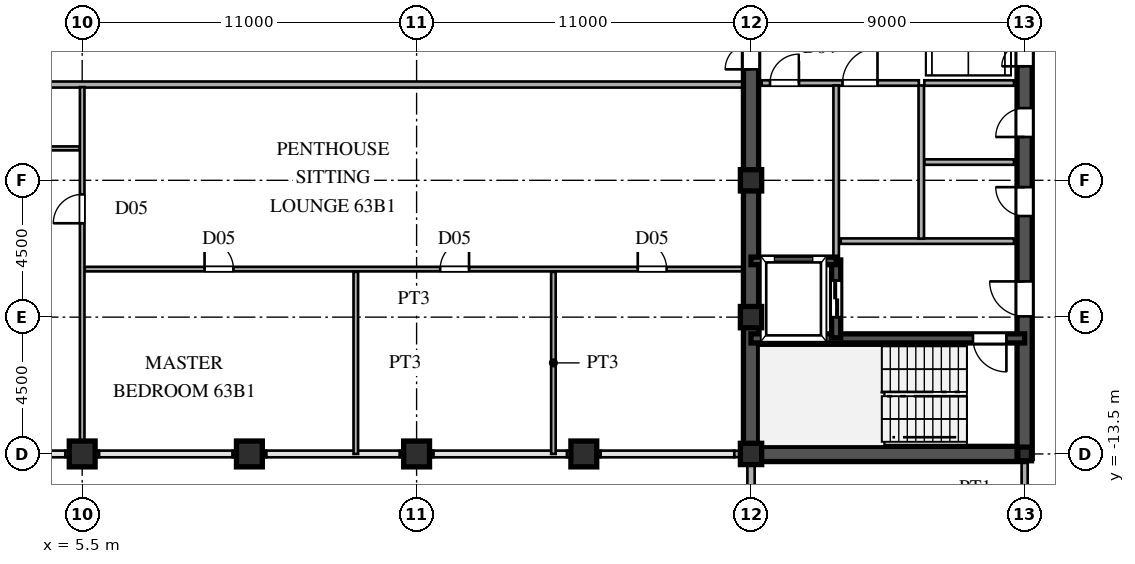
"""IFC4 building model, lengths in metres.
Left out: names, types, materials, properties, quantities, classifications, styles, units other than length and angle.
Written with IfcOpenShell. Run it as: python <this file> out.ifc"""

import sys

from ifc_helpers import new_model, si_unit, direction, frame, frame_2d, origin, origin_2d, place, context, subcontext, project, spatial, rectangle, hollow_rectangle, i_section, extrude, source, transform, mapped, element, fill, save


model = new_model("IFC4")
c1 = context("Model", 3, precision=1e-05, world=origin(), true_north=direction((0.0, 1.0)))
c2 = subcontext(c1, "Body", "Model", "MODEL_VIEW")
j1 = project(units=[si_unit("LENGTHUNIT", "METRE"), si_unit("PLANEANGLEUNIT", "RADIAN")], contexts=[c1])
p1 = place(None, origin())
s1 = spatial("IfcSite", under=j1, at=p1, CompositionType="ELEMENT")
p2 = place(p1, origin())
s2 = spatial("IfcBuilding", under=s1, at=p2, CompositionType="ELEMENT")
p3 = place(p2, frame((0.0, 0.0, 239.4)))
s3 = spatial("IfcBuildingStorey", under=s2, at=p3, CompositionType="ELEMENT", Elevation=239.4)
m1 = source(origin(), c2, "Body", "SweptSolid", [
    extrude(hollow_rectangle(XDim=0.7, YDim=0.7, WallThickness=0.03, at=origin_2d()), origin(), (0.0, 0.0, 1.0), 3.75),
])
for number, where, z_axis, x_axis in (
    (1, (27.5, -13.5, 0.0), (0.0, 0.0, 1.0), (1.0, 0.0, 0.0)),
    (2, (27.5, -9.0, 0.0), (0.0, 0.0, 1.0), (1.0, 0.0, 0.0)),
    (3, (27.5, -4.5, 0.0), (0.0, 0.0, 1.0), (1.0, 0.0, 0.0)),
):
    element("IfcColumn", number, at=place(p3, frame(where, z_axis=z_axis, x_axis=x_axis)), inside=s3, PredefinedType="COLUMN", context=c2, shape_type="MappedRepresentation", body=[
        mapped(m1, transform((0.0, 0.0, 0.0), scale=1.0)),
    ])
m2 = source(origin(), c2, "Body", "SweptSolid", [
    extrude(i_section(OverallWidth=0.45, OverallDepth=0.45, WebThickness=0.016, FlangeThickness=0.025, at=origin_2d()), origin(), (0.0, 0.0, 1.0), 3.75),
])
p4 = place(p3, frame((36.5, -13.5, 0.0), z_axis=(0.0, 0.0, 1.0), x_axis=(1.0, 0.0, 0.0)))
e4 = element("IfcColumn", 4, at=p4, inside=s3, PredefinedType="COLUMN", context=c2, shape_type="MappedRepresentation", body=[
    mapped(m2, transform((0.0, 0.0, 0.0), scale=1.0)),
])
m3 = source(origin(), c2, "Body", "SweptSolid", [
    extrude(hollow_rectangle(XDim=0.85, YDim=0.85, WallThickness=0.036, at=origin_2d()), origin(), (0.0, 0.0, 1.0), 3.75),
])
for number, where, z_axis, x_axis in (
    (5, (5.5, -13.5, 0.0), (0.0, 0.0, 1.0), (1.0, 0.0, 0.0)),
    (6, (11.0, -13.5, 0.0), (0.0, 0.0, 1.0), (1.0, 0.0, 0.0)),
    (7, (16.5, -13.5, 0.0), (0.0, 0.0, 1.0), (1.0, 0.0, 0.0)),
    (8, (22.0, -13.5, 0.0), (0.0, 0.0, 1.0), (1.0, 0.0, 0.0)),
):
    element("IfcColumn", number, at=place(p3, frame(where, z_axis=z_axis, x_axis=x_axis)), inside=s3, PredefinedType="COLUMN", context=c2, shape_type="MappedRepresentation", body=[
        mapped(m3, transform((0.0, 0.0, 0.0), scale=1.0)),
    ])
p5 = place(p3, frame((27.5, -15.98, 0.0), z_axis=(0.0, 0.0, 1.0), x_axis=(0.0, 1.0, 0.0)))
e9 = element("IfcWall", 9, at=p5, inside=s3, PredefinedType="SOLIDWALL", context=c2, shape_type="SweptSolid", body=[
    extrude(rectangle(XDim=1.605, YDim=0.24, at=frame_2d((0.803, 0.0))), origin(), (0.0, 0.0, 1.0), 3.53),
])
p6 = place(p3, frame((27.5, -14.375, 0.0), z_axis=(0.0, 0.0, 1.0), x_axis=(0.0, 1.0, 0.0)))
e10 = element("IfcWall", 10, at=p6, inside=s3, PredefinedType="SOLIDWALL", context=c2, shape_type="SweptSolid", body=[
    extrude(rectangle(XDim=0.62, YDim=0.24, at=frame_2d((0.31, 0.0))), origin(), (0.0, 0.0, 1.0), 3.03),
])
for number, where, z_axis, x_axis in (
    (11, (4.95, -13.5, 0.0), (0.0, 0.0, 1.0), (1.0, 0.0, 0.0)),
    (12, (10.45, -13.5, 0.0), (0.0, 0.0, 1.0), (1.0, 0.0, 0.0)),
    (13, (15.95, -13.5, 0.0), (0.0, 0.0, 1.0), (1.0, 0.0, 0.0)),
    (14, (21.45, -13.5, 0.0), (0.0, 0.0, 1.0), (1.0, 0.0, 0.0)),
):
    element("IfcWall", number, at=place(p3, frame(where, z_axis=z_axis, x_axis=x_axis)), inside=s3, PredefinedType="SOLIDWALL", context=c2, shape_type="SweptSolid", body=[
        extrude(rectangle(XDim=1.1, YDim=0.21, at=frame_2d((0.55, 0.0))), origin(), (0.0, 0.0, 1.0), 3.03),
    ])
p7 = place(p3, frame((26.95, -13.5, 0.0), z_axis=(0.0, 0.0, 1.0), x_axis=(1.0, 0.0, 0.0)))
e15 = element("IfcWall", 15, at=p7, inside=s3, PredefinedType="SOLIDWALL", context=c2, shape_type="SweptSolid", body=[
    extrude(rectangle(XDim=0.54, YDim=0.21, at=frame_2d((0.27, 0.0))), origin(), (0.0, 0.0, 1.0), 3.03),
])
p8 = place(p3, frame((27.5, -13.5, 0.0), z_axis=(0.0, 0.0, 1.0), x_axis=(0.0, 1.0, 0.0)))
e16 = element("IfcWall", 16, at=p8, inside=s3, PredefinedType="SHEAR", context=c2, shape_type="SweptSolid", body=[
    extrude(rectangle(XDim=12.2, YDim=0.5, at=frame_2d((6.1, 0.0))), origin(), (0.0, 0.0, 1.0), 3.53),
])
p9 = place(p3, frame((27.5, -1.3, 0.0), z_axis=(0.0, 0.0, 1.0), x_axis=(0.0, 1.0, 0.0)))
e17 = element("IfcWall", 17, at=p9, inside=s3, PredefinedType="SHEAR", context=c2, shape_type="SweptSolid", body=[
    extrude(rectangle(XDim=2.6, YDim=0.5, at=frame_2d((1.3, 0.0))), origin(), (0.0, 0.0, 1.0), 3.53),
])
p10 = place(p9, frame((0.45, 0.0, 0.0)))
e18 = element("IfcOpeningElement", 18, at=p10, cuts=e17, PredefinedType="OPENING", context=c2, shape_type="SweptSolid", body=[
    extrude(rectangle(XDim=1.7, YDim=2.35, at=frame_2d((0.85, 1.175))), frame((0.0, 0.26, 0.0), z_axis=(0.0, -1.0, 0.0), x_axis=(1.0, 0.0, 0.0)), (0.0, 0.0, 1.0), 0.52),
])
p11 = place(p3, frame((27.5, -13.5, 0.0), z_axis=(0.0, 0.0, 1.0), x_axis=(1.0, 0.0, 0.0)))
e19 = element("IfcWall", 19, at=p11, inside=s3, PredefinedType="SHEAR", context=c2, shape_type="SweptSolid", body=[
    extrude(rectangle(XDim=9.0, YDim=0.5, at=frame_2d((4.5, 0.0))), origin(), (0.0, 0.0, 1.0), 3.53),
])
p12 = place(p3, frame((36.5, -13.65, 0.0), z_axis=(0.0, 0.0, 1.0), x_axis=(0.0, 1.0, 0.0)))
e20 = element("IfcWall", 20, at=p12, inside=s3, PredefinedType="SHEAR", context=c2, shape_type="SweptSolid", body=[
    extrude(rectangle(XDim=7.15, YDim=0.5, at=frame_2d((3.575, 0.0))), origin(), (0.0, 0.0, 1.0), 3.53),
])
p13 = place(p12, frame((4.675, 0.0, 0.0)))
e21 = element("IfcOpeningElement", 21, at=p13, cuts=e20, PredefinedType="OPENING", context=c2, shape_type="SweptSolid", body=[
    extrude(rectangle(XDim=1.15, YDim=2.2, at=frame_2d((0.575, 1.1))), frame((0.0, 0.26, 0.0), z_axis=(0.0, -1.0, 0.0), x_axis=(1.0, 0.0, 0.0)), (0.0, 0.0, 1.0), 0.52),
])
p14 = place(p3, frame((36.5, -1.3, 0.0), z_axis=(0.0, 0.0, 1.0), x_axis=(0.0, 1.0, 0.0)))
e22 = element("IfcWall", 22, at=p14, inside=s3, PredefinedType="SHEAR", context=c2, shape_type="SweptSolid", body=[
    extrude(rectangle(XDim=2.6, YDim=0.5, at=frame_2d((1.3, 0.0))), origin(), (0.0, 0.0, 1.0), 3.53),
])
p15 = place(p14, frame((0.55, 0.0, 0.0)))
e23 = element("IfcOpeningElement", 23, at=p15, cuts=e22, PredefinedType="OPENING", context=c2, shape_type="SweptSolid", body=[
    extrude(rectangle(XDim=1.5, YDim=2.3, at=frame_2d((0.75, 1.15))), frame((0.0, 0.26, 0.0), z_axis=(0.0, -1.0, 0.0), x_axis=(1.0, 0.0, 0.0)), (0.0, 0.0, 1.0), 0.52),
])
p16 = place(p3, frame((36.5, -6.5, 0.0), z_axis=(0.0, 0.0, 1.0), x_axis=(0.0, 1.0, 0.0)))
e24 = element("IfcWall", 24, at=p16, inside=s3, PredefinedType="SHEAR", context=c2, shape_type="SweptSolid", body=[
    extrude(rectangle(XDim=2.6, YDim=0.5, at=frame_2d((1.3, 0.0))), origin(), (0.0, 0.0, 1.0), 3.53),
])
p17 = place(p16, frame((0.825, 0.0, 0.0)))
e25 = element("IfcOpeningElement", 25, at=p17, cuts=e24, PredefinedType="OPENING", context=c2, shape_type="SweptSolid", body=[
    extrude(rectangle(XDim=0.95, YDim=2.15, at=frame_2d((0.475, 1.075))), frame((0.0, 0.26, 0.0), z_axis=(0.0, -1.0, 0.0), x_axis=(1.0, 0.0, 0.0)), (0.0, 0.0, 1.0), 0.52),
])
p18 = place(p3, frame((36.5, -3.9, 0.0), z_axis=(0.0, 0.0, 1.0), x_axis=(0.0, 1.0, 0.0)))
e26 = element("IfcWall", 26, at=p18, inside=s3, PredefinedType="SHEAR", context=c2, shape_type="SweptSolid", body=[
    extrude(rectangle(XDim=2.6, YDim=0.5, at=frame_2d((1.3, 0.0))), origin(), (0.0, 0.0, 1.0), 3.53),
])
p19 = place(p18, frame((0.825, 0.0, 0.0)))
e27 = element("IfcOpeningElement", 27, at=p19, cuts=e26, PredefinedType="OPENING", context=c2, shape_type="SweptSolid", body=[
    extrude(rectangle(XDim=0.95, YDim=2.15, at=frame_2d((0.475, 1.075))), frame((0.0, 0.26, 0.0), z_axis=(0.0, -1.0, 0.0), x_axis=(1.0, 0.0, 0.0)), (0.0, 0.0, 1.0), 0.52),
])
p20 = place(p3, frame((27.5, -9.7, 0.0), z_axis=(0.0, 0.0, 1.0), x_axis=(1.0, 0.0, 0.0)))
e28 = element("IfcWall", 28, at=p20, inside=s3, PredefinedType="SHEAR", context=c2, shape_type="SweptSolid", body=[
    extrude(rectangle(XDim=9.0, YDim=0.3, at=frame_2d((4.5, 0.0))), origin(), (0.0, 0.0, 1.0), 3.53),
])
p21 = place(p20, frame((7.3, 0.0, 0.0)))
e29 = element("IfcOpeningElement", 29, at=p21, cuts=e28, PredefinedType="OPENING", context=c2, shape_type="SweptSolid", body=[
    extrude(rectangle(XDim=1.1, YDim=2.2, at=frame_2d((0.55, 1.1))), frame((0.0, 0.16, 0.0), z_axis=(0.0, -1.0, 0.0), x_axis=(1.0, 0.0, 0.0)), (0.0, 0.0, 1.0), 0.32),
])
p22 = place(p3, frame((27.5, -7.15, 0.0), z_axis=(0.0, 0.0, 1.0), x_axis=(1.0, 0.0, 0.0)))
e30 = element("IfcWall", 30, at=p22, inside=s3, PredefinedType="SHEAR", context=c2, shape_type="SweptSolid", body=[
    extrude(rectangle(XDim=2.8, YDim=0.25, at=frame_2d((1.4, 0.0))), origin(), (0.0, 0.0, 1.0), 3.53),
])
p23 = place(p3, frame((30.3, -9.68, 0.0), z_axis=(0.0, 0.0, 1.0), x_axis=(0.0, 1.0, 0.0)))
e31 = element("IfcWall", 31, at=p23, inside=s3, PredefinedType="SHEAR", context=c2, shape_type="SweptSolid", body=[
    extrude(rectangle(XDim=2.56, YDim=0.3, at=frame_2d((1.28, 0.0))), origin(), (0.0, 0.0, 1.0), 3.53),
])
p24 = place(p23, frame((0.68, 0.0, 0.0)))
e32 = element("IfcOpeningElement", 32, at=p24, cuts=e31, PredefinedType="OPENING", context=c2, shape_type="SweptSolid", body=[
    extrude(rectangle(XDim=1.2, YDim=2.25, at=frame_2d((0.6, 1.125))), frame((0.0, 0.16, 0.0), z_axis=(0.0, -1.0, 0.0), x_axis=(1.0, 0.0, 0.0)), (0.0, 0.0, 1.0), 0.32),
])
p25 = place(p3, frame((30.45, -6.5, 0.0), z_axis=(0.0, 0.0, 1.0), x_axis=(1.0, 0.0, 0.0)))
e33 = element("IfcWall", 33, at=p25, inside=s3, PredefinedType="PARTITIONING", context=c2, shape_type="SweptSolid", body=[
    extrude(rectangle(XDim=5.7, YDim=0.18, at=frame_2d((2.85, 0.0))), origin(), (0.0, 0.0, 1.0), 3.53),
])
p26 = place(p3, frame((33.1, -6.42, 0.0), z_axis=(0.0, 0.0, 1.0), x_axis=(0.0, 1.0, 0.0)))
e34 = element("IfcWall", 34, at=p26, inside=s3, PredefinedType="PARTITIONING", context=c2, shape_type="SweptSolid", body=[
    extrude(rectangle(XDim=5.04, YDim=0.18, at=frame_2d((2.52, 0.0))), origin(), (0.0, 0.0, 1.0), 3.53),
])
p27 = place(p3, frame((27.85, -1.3, 0.0), z_axis=(0.0, 0.0, 1.0), x_axis=(1.0, 0.0, 0.0)))
e35 = element("IfcWall", 35, at=p27, inside=s3, PredefinedType="PARTITIONING", context=c2, shape_type="SweptSolid", body=[
    extrude(rectangle(XDim=2.45, YDim=0.18, at=frame_2d((1.225, 0.0))), origin(), (0.0, 0.0, 1.0), 3.53),
])
p28 = place(p27, frame((0.275, 0.0, 0.0)))
e36 = element("IfcOpeningElement", 36, at=p28, cuts=e35, PredefinedType="OPENING", context=c2, shape_type="SweptSolid", body=[
    extrude(rectangle(XDim=0.95, YDim=2.15, at=frame_2d((0.475, 1.075))), frame((0.0, 0.1, 0.0), z_axis=(0.0, -1.0, 0.0), x_axis=(1.0, 0.0, 0.0)), (0.0, 0.0, 1.0), 0.2),
])
p29 = place(p3, frame((30.3, -1.3, 0.0), z_axis=(0.0, 0.0, 1.0), x_axis=(1.0, 0.0, 0.0)))
e37 = element("IfcWall", 37, at=p29, inside=s3, PredefinedType="PARTITIONING", context=c2, shape_type="SweptSolid", body=[
    extrude(rectangle(XDim=2.72, YDim=0.18, at=frame_2d((1.36, 0.0))), origin(), (0.0, 0.0, 1.0), 3.53),
])
p30 = place(p29, frame((0.21, 0.0, 0.0)))
e38 = element("IfcOpeningElement", 38, at=p30, cuts=e37, PredefinedType="OPENING", context=c2, shape_type="SweptSolid", body=[
    extrude(rectangle(XDim=1.15, YDim=2.2, at=frame_2d((0.575, 1.1))), frame((0.0, 0.1, 0.0), z_axis=(0.0, -1.0, 0.0), x_axis=(1.0, 0.0, 0.0)), (0.0, 0.0, 1.0), 0.2),
])
p31 = place(p3, frame((30.3, -7.12, 0.0), z_axis=(0.0, 0.0, 1.0), x_axis=(0.0, 1.0, 0.0)))
e39 = element("IfcWall", 39, at=p31, inside=s3, PredefinedType="PARTITIONING", context=c2, shape_type="SweptSolid", body=[
    extrude(rectangle(XDim=5.74, YDim=0.18, at=frame_2d((2.87, 0.0))), origin(), (0.0, 0.0, 1.0), 3.53),
])
for number, where, z_axis, x_axis in (
    (40, (33.2, -1.3, 0.0), (0.0, 0.0, 1.0), (1.0, 0.0, 0.0)),
    (41, (33.2, -3.9, 0.0), (0.0, 0.0, 1.0), (1.0, 0.0, 0.0)),
):
    element("IfcWall", number, at=place(p3, frame(where, z_axis=z_axis, x_axis=x_axis)), inside=s3, PredefinedType="PARTITIONING", context=c2, shape_type="SweptSolid", body=[
        extrude(rectangle(XDim=2.95, YDim=0.18, at=frame_2d((1.475, 0.0))), origin(), (0.0, 0.0, 1.0), 3.53),
    ])
p32 = place(p3, frame((5.585, -7.42, 0.0), z_axis=(0.0, 0.0, 1.0), x_axis=(1.0, 0.0, 0.0)))
e42 = element("IfcWall", 42, at=p32, inside=s3, PredefinedType="PARTITIONING", context=c2, shape_type="SweptSolid", body=[
    extrude(rectangle(XDim=21.66, YDim=0.15, at=frame_2d((10.83, 0.0))), origin(), (0.0, 0.0, 1.0), 3.53),
])
p33 = place(p32, frame((3.94, 0.0, 0.0)))
e43 = element("IfcOpeningElement", 43, at=p33, cuts=e42, PredefinedType="OPENING", context=c2, shape_type="SweptSolid", body=[
    extrude(rectangle(XDim=0.95, YDim=2.15, at=frame_2d((0.475, 1.075))), frame((0.0, 0.085, 0.0), z_axis=(0.0, -1.0, 0.0), x_axis=(1.0, 0.0, 0.0)), (0.0, 0.0, 1.0), 0.17),
])
p34 = place(p32, frame((11.69, 0.0, 0.0)))
e44 = element("IfcOpeningElement", 44, at=p34, cuts=e42, PredefinedType="OPENING", context=c2, shape_type="SweptSolid", body=[
    extrude(rectangle(XDim=0.95, YDim=2.15, at=frame_2d((0.475, 1.075))), frame((0.0, 0.085, 0.0), z_axis=(0.0, -1.0, 0.0), x_axis=(1.0, 0.0, 0.0)), (0.0, 0.0, 1.0), 0.17),
])
p35 = place(p32, frame((18.19, 0.0, 0.0)))
e45 = element("IfcOpeningElement", 45, at=p35, cuts=e42, PredefinedType="OPENING", context=c2, shape_type="SweptSolid", body=[
    extrude(rectangle(XDim=0.95, YDim=2.15, at=frame_2d((0.475, 1.075))), frame((0.0, 0.085, 0.0), z_axis=(0.0, -1.0, 0.0), x_axis=(1.0, 0.0, 0.0)), (0.0, 0.0, 1.0), 0.17),
])
p36 = place(p3, frame((0.085, -3.45, 0.0), z_axis=(0.0, 0.0, 1.0), x_axis=(1.0, 0.0, 0.0)))
e46 = element("IfcWall", 46, at=p36, inside=s3, PredefinedType="PARTITIONING", context=c2, shape_type="SweptSolid", body=[
    extrude(rectangle(XDim=5.33, YDim=0.13, at=frame_2d((2.665, 0.0))), origin(), (0.0, 0.0, 1.0), 3.53),
])
p37 = place(p3, frame((-27.245, -1.35, 0.0), z_axis=(0.0, 0.0, 1.0), x_axis=(1.0, 0.0, 0.0)))
e47 = element("IfcWall", 47, at=p37, inside=s3, PredefinedType="PARTITIONING", context=c2, shape_type="SweptSolid", body=[
    extrude(rectangle(XDim=54.49, YDim=0.2, at=frame_2d((27.245, 0.0))), origin(), (0.0, 0.0, 1.0), 3.53),
])
p38 = place(p37, frame((23.47, 0.0, 0.0)))
e48 = element("IfcOpeningElement", 48, at=p38, cuts=e47, PredefinedType="OPENING", context=c2, shape_type="SweptSolid", body=[
    extrude(rectangle(XDim=1.05, YDim=2.25, at=frame_2d((0.525, 1.125))), frame((0.0, 0.11, 0.0), z_axis=(0.0, -1.0, 0.0), x_axis=(1.0, 0.0, 0.0)), (0.0, 0.0, 1.0), 0.22),
])
p39 = place(p3, frame((5.5, -13.39, 0.0), z_axis=(0.0, 0.0, 1.0), x_axis=(0.0, 1.0, 0.0)))
e49 = element("IfcWall", 49, at=p39, inside=s3, PredefinedType="PARTITIONING", context=c2, shape_type="SweptSolid", body=[
    extrude(rectangle(XDim=11.955, YDim=0.15, at=frame_2d((5.978, 0.0))), origin(), (0.0, 0.0, 1.0), 2.43),
])
p40 = place(p39, frame((7.478, 0.0, 0.0)))
e50 = element("IfcOpeningElement", 50, at=p40, cuts=e49, PredefinedType="OPENING", context=c2, shape_type="SweptSolid", body=[
    extrude(rectangle(XDim=0.95, YDim=2.15, at=frame_2d((0.475, 1.075))), frame((0.0, 0.085, 0.0), z_axis=(0.0, -1.0, 0.0), x_axis=(1.0, 0.0, 0.0)), (0.0, 0.0, 1.0), 0.17),
])
for number, where, z_axis, x_axis in (
    (51, (14.5, -13.5, 0.0), (0.0, 0.0, 1.0), (0.0, 1.0, 0.0)),
    (52, (21.0, -13.5, 0.0), (0.0, 0.0, 1.0), (0.0, 1.0, 0.0)),
):
    element("IfcWall", number, at=place(p3, frame(where, z_axis=z_axis, x_axis=x_axis)), inside=s3, PredefinedType="PARTITIONING", context=c2, shape_type="SweptSolid", body=[
        extrude(rectangle(XDim=5.99, YDim=0.15, at=frame_2d((2.995, 0.0))), origin(), (0.0, 0.0, 1.0), 3.53),
    ])
p41 = place(p3, frame((36.5, -15.515, 0.0), z_axis=(0.0, 0.0, 1.0), x_axis=(0.0, 1.0, 0.0)))
e53 = element("IfcWall", 53, at=p41, inside=s3, PredefinedType="PARTITIONING", context=c2, shape_type="SweptSolid", body=[
    extrude(rectangle(XDim=1.76, YDim=0.2, at=frame_2d((0.88, 0.0))), origin(), (0.0, 0.0, 1.0), 2.93),
])
m4 = source(origin(), c2, "Body", "SweptSolid", [
    extrude(rectangle(XDim=1.7, YDim=2.35, at=frame_2d((0.85, 1.175))), frame((0.0, 0.025, 0.0), z_axis=(0.0, -1.0, 0.0), x_axis=(1.0, 0.0, 0.0)), (0.0, 0.0, 1.0), 0.05),
])
p42 = place(p10, origin())
e54 = element("IfcDoor", 54, at=p42, inside=s3, OperationType="DOUBLE_SWING_LEFT", PredefinedType="DOOR", context=c2, shape_type="MappedRepresentation", body=[
    mapped(m4, transform((0.0, 0.0, 0.0), scale=1.0)),
])
fill(e18, e54)
m5 = source(origin(), c2, "Body", "SweptSolid", [
    extrude(rectangle(XDim=1.15, YDim=2.2, at=frame_2d((0.575, 1.1))), frame((0.0, 0.025, 0.0), z_axis=(0.0, -1.0, 0.0), x_axis=(1.0, 0.0, 0.0)), (0.0, 0.0, 1.0), 0.05),
])
p43 = place(p13, origin())
e55 = element("IfcDoor", 55, at=p43, inside=s3, OperationType="SINGLE_SWING_RIGHT", PredefinedType="DOOR", context=c2, shape_type="MappedRepresentation", body=[
    mapped(m5, transform((0.0, 0.0, 0.0), scale=1.0)),
])
fill(e21, e55)
m6 = source(origin(), c2, "Body", "SweptSolid", [
    extrude(rectangle(XDim=1.5, YDim=2.3, at=frame_2d((0.75, 1.15))), frame((0.0, 0.025, 0.0), z_axis=(0.0, -1.0, 0.0), x_axis=(1.0, 0.0, 0.0)), (0.0, 0.0, 1.0), 0.05),
])
p44 = place(p15, origin())
e56 = element("IfcDoor", 56, at=p44, inside=s3, OperationType="DOUBLE_SWING_LEFT", PredefinedType="DOOR", context=c2, shape_type="MappedRepresentation", body=[
    mapped(m6, transform((0.0, 0.0, 0.0), scale=1.0)),
])
fill(e23, e56)
m7 = source(origin(), c2, "Body", "SweptSolid", [
    extrude(rectangle(XDim=0.95, YDim=2.15, at=frame_2d((0.475, 1.075))), frame((0.0, 0.025, 0.0), z_axis=(0.0, -1.0, 0.0), x_axis=(1.0, 0.0, 0.0)), (0.0, 0.0, 1.0), 0.05),
])
p45 = place(p17, origin())
e57 = element("IfcDoor", 57, at=p45, inside=s3, OperationType="SINGLE_SWING_RIGHT", PredefinedType="DOOR", context=c2, shape_type="MappedRepresentation", body=[
    mapped(m7, transform((0.0, 0.0, 0.0), scale=1.0)),
])
fill(e25, e57)
p46 = place(p19, origin())
e58 = element("IfcDoor", 58, at=p46, inside=s3, OperationType="SINGLE_SWING_LEFT", PredefinedType="DOOR", context=c2, shape_type="MappedRepresentation", body=[
    mapped(m7, transform((0.0, 0.0, 0.0), scale=1.0)),
])
fill(e27, e58)
m8 = source(origin(), c2, "Body", "SweptSolid", [
    extrude(rectangle(XDim=1.1, YDim=2.2, at=frame_2d((0.55, 1.1))), frame((0.0, 0.025, 0.0), z_axis=(0.0, -1.0, 0.0), x_axis=(1.0, 0.0, 0.0)), (0.0, 0.0, 1.0), 0.05),
])
p47 = place(p21, frame((1.1, 0.0, 0.0), z_axis=(0.0, 0.0, 1.0), x_axis=(-1.0, 0.0, 0.0)))
e59 = element("IfcDoor", 59, at=p47, inside=s3, OperationType="SINGLE_SWING_RIGHT", PredefinedType="DOOR", context=c2, shape_type="MappedRepresentation", body=[
    mapped(m8, transform((0.0, 0.0, 0.0), scale=1.0)),
])
fill(e29, e59)
m9 = source(origin(), c2, "Body", "SweptSolid", [
    extrude(rectangle(XDim=1.2, YDim=2.25, at=frame_2d((0.6, 1.125))), frame((0.0, 0.025, 0.0), z_axis=(0.0, -1.0, 0.0), x_axis=(1.0, 0.0, 0.0)), (0.0, 0.0, 1.0), 0.05),
])
p48 = place(p24, origin())
e60 = element("IfcDoor", 60, at=p48, inside=s3, OperationType="DOUBLE_DOOR_SLIDING", PredefinedType="DOOR", context=c2, shape_type="MappedRepresentation", body=[
    mapped(m9, transform((0.0, 0.0, 0.0), scale=1.0)),
])
fill(e32, e60)
p49 = place(p28, origin())
e61 = element("IfcDoor", 61, at=p49, inside=s3, OperationType="SINGLE_SWING_RIGHT", PredefinedType="DOOR", context=c2, shape_type="MappedRepresentation", body=[
    mapped(m7, transform((0.0, 0.0, 0.0), scale=1.0)),
])
fill(e36, e61)
p50 = place(p30, origin())
e62 = element("IfcDoor", 62, at=p50, inside=s3, OperationType="SINGLE_SWING_RIGHT", PredefinedType="DOOR", context=c2, shape_type="MappedRepresentation", body=[
    mapped(m5, transform((0.0, 0.0, 0.0), scale=1.0)),
])
fill(e38, e62)
m10 = source(origin(), c2, "Body", "SweptSolid", [
    extrude(rectangle(XDim=0.95, YDim=2.15, at=frame_2d((0.475, 1.075))), frame((0.0, 0.025, 0.0), z_axis=(0.0, -1.0, 0.0), x_axis=(1.0, 0.0, 0.0)), (0.0, 0.0, 1.0), 0.05),
])
p51 = place(p33, origin())
e63 = element("IfcDoor", 63, at=p51, inside=s3, OperationType="SINGLE_SWING_LEFT", PredefinedType="DOOR", context=c2, shape_type="MappedRepresentation", body=[
    mapped(m10, transform((0.0, 0.0, 0.0), scale=1.0)),
])
fill(e43, e63)
p52 = place(p34, origin())
e64 = element("IfcDoor", 64, at=p52, inside=s3, OperationType="SINGLE_SWING_RIGHT", PredefinedType="DOOR", context=c2, shape_type="MappedRepresentation", body=[
    mapped(m10, transform((0.0, 0.0, 0.0), scale=1.0)),
])
fill(e44, e64)
p53 = place(p35, origin())
e65 = element("IfcDoor", 65, at=p53, inside=s3, OperationType="SINGLE_SWING_LEFT", PredefinedType="DOOR", context=c2, shape_type="MappedRepresentation", body=[
    mapped(m10, transform((0.0, 0.0, 0.0), scale=1.0)),
])
fill(e45, e65)
p54 = place(p40, origin())
e66 = element("IfcDoor", 66, at=p54, inside=s3, OperationType="SINGLE_SWING_LEFT", PredefinedType="DOOR", context=c2, shape_type="MappedRepresentation", body=[
    mapped(m10, transform((0.0, 0.0, 0.0), scale=1.0)),
])
fill(e50, e66)
save(model, sys.argv[1])
